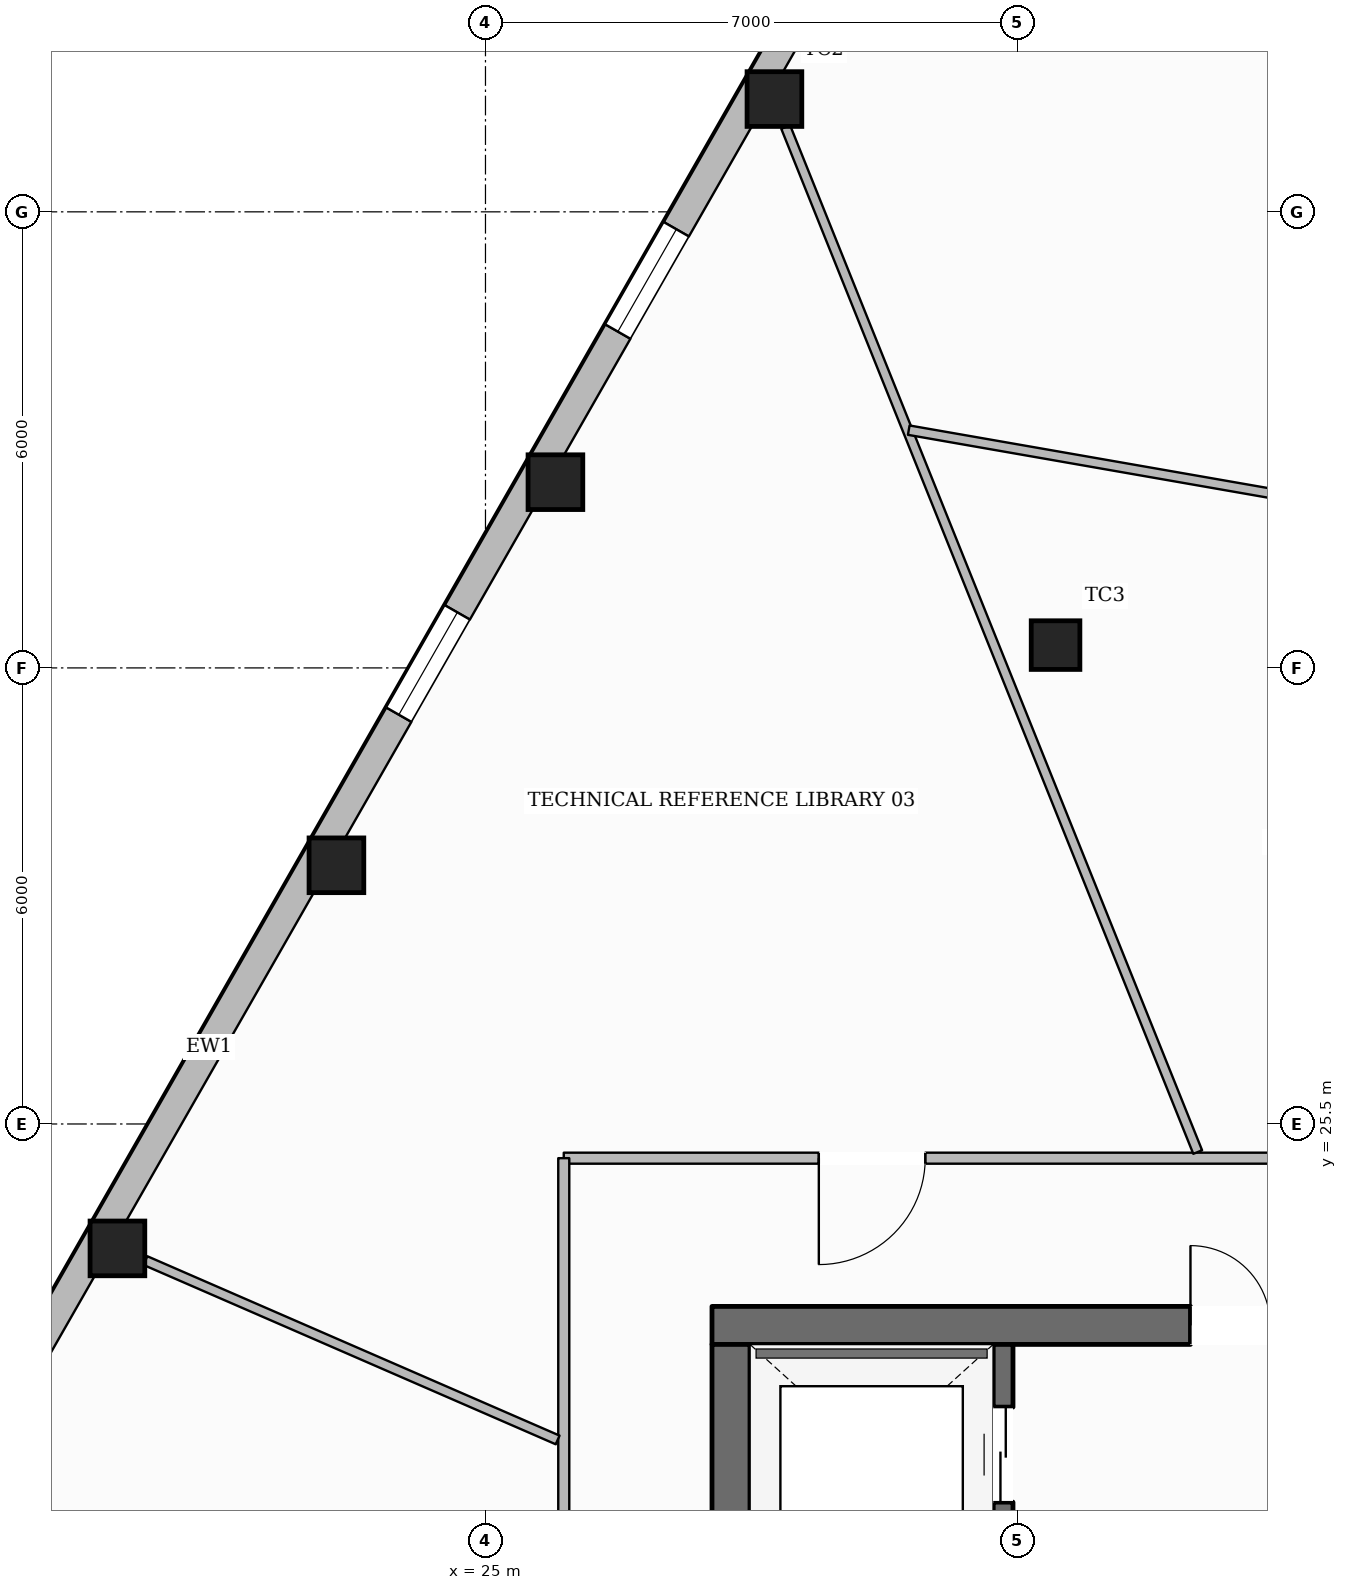
"""IFC4 building model, lengths in metres.
Left out: names, types, materials, properties, quantities, classifications, styles, units other than length and angle.
Written with IfcOpenShell. Run it as: python <this file> out.ifc"""

import sys

from ifc_helpers import new_model, si_unit, direction, frame, frame_2d, origin, origin_2d, place, context, subcontext, project, spatial, rectangle, hollow_rectangle, extrude, element, fill, save


model = new_model("IFC4")
c1 = context("Model", 3, precision=1e-05, world=origin(), true_north=direction((0.0, 1.0)))
c2 = subcontext(c1, "Body", "Model", "MODEL_VIEW")
j1 = project(units=[si_unit("LENGTHUNIT", "METRE"), si_unit("PLANEANGLEUNIT", "RADIAN")], contexts=[c1])
p1 = place(None, origin())
s1 = spatial("IfcSite", under=j1, at=p1, CompositionType="ELEMENT")
p2 = place(p1, origin())
s2 = spatial("IfcBuilding", under=s1, at=p2, CompositionType="ELEMENT")
p3 = place(p2, frame((0.0, 0.0, 89.35)))
s3 = spatial("IfcBuildingStorey", under=s2, at=p3, CompositionType="ELEMENT", Elevation=89.35)
p4 = place(p3, frame((27.98, 22.85, 0.0), z_axis=(0.0, 0.0, 1.0), x_axis=(1.0, 0.0, 0.0)))
e1 = element("IfcWall", 1, at=p4, inside=s3, PredefinedType="SOLIDWALL", context=c2, shape_type="SweptSolid", body=[
    extrude(rectangle(XDim=20.04, YDim=0.5, at=frame_2d((10.02, 0.0))), origin(), (0.0, 0.0, 1.0), 3.6),
])
p5 = place(p4, frame((6.295, 0.0, 0.0)))
e2 = element("IfcOpeningElement", 2, at=p5, cuts=e1, PredefinedType="OPENING", context=c2, shape_type="SweptSolid", body=[
    extrude(rectangle(XDim=1.05, YDim=2.15, at=frame_2d((0.525, 1.075))), frame((0.0, 0.26, 0.0), z_axis=(0.0, -1.0, 0.0), x_axis=(1.0, 0.0, 0.0)), (0.0, 0.0, 1.0), 0.52),
])
p6 = place(p4, frame((12.695, 0.0, 0.0)))
e3 = element("IfcOpeningElement", 3, at=p6, cuts=e1, PredefinedType="OPENING", context=c2, shape_type="SweptSolid", body=[
    extrude(rectangle(XDim=1.05, YDim=2.15, at=frame_2d((0.525, 1.075))), frame((0.0, 0.26, 0.0), z_axis=(0.0, -1.0, 0.0), x_axis=(1.0, 0.0, 0.0)), (0.0, 0.0, 1.0), 0.52),
])
p7 = place(p3, frame((28.23, 9.6, 0.0), z_axis=(0.0, 0.0, 1.0), x_axis=(0.0, 1.0, 0.0)))
e4 = element("IfcWall", 4, at=p7, inside=s3, PredefinedType="SOLIDWALL", context=c2, shape_type="SweptSolid", body=[
    extrude(rectangle(XDim=13.0, YDim=0.5, at=frame_2d((6.5, 0.0))), origin(), (0.0, 0.0, 1.0), 3.6),
])
p8 = place(p7, frame((0.2, 0.0, 0.0)))
e5 = element("IfcOpeningElement", 5, at=p8, cuts=e4, PredefinedType="OPENING", context=c2, shape_type="SweptSolid", body=[
    extrude(rectangle(XDim=1.1, YDim=2.15, at=frame_2d((0.55, 1.075))), frame((0.0, 0.26, 0.0), z_axis=(0.0, -1.0, 0.0), x_axis=(1.0, 0.0, 0.0)), (0.0, 0.0, 1.0), 0.52),
])
p9 = place(p7, frame((8.4, 0.0, 0.0)))
e6 = element("IfcOpeningElement", 6, at=p9, cuts=e4, PredefinedType="OPENING", context=c2, shape_type="SweptSolid", body=[
    extrude(rectangle(XDim=0.9, YDim=2.1, at=frame_2d((0.45, 1.05))), frame((0.0, 0.26, 0.0), z_axis=(0.0, -1.0, 0.0), x_axis=(1.0, 0.0, 0.0)), (0.0, 0.0, 1.0), 0.52),
])
p10 = place(p3, frame((31.81, 9.6, 0.0), z_axis=(0.0, 0.0, 1.0), x_axis=(0.0, 1.0, 0.0)))
e7 = element("IfcWall", 7, at=p10, inside=s3, PredefinedType="SHEAR", context=c2, shape_type="SweptSolid", body=[
    extrude(rectangle(XDim=13.0, YDim=0.26, at=frame_2d((6.5, 0.0))), origin(), (0.0, 0.0, 1.0), 3.6),
])
p11 = place(p10, frame((10.925, 0.0, 0.0)))
e8 = element("IfcOpeningElement", 8, at=p11, cuts=e7, PredefinedType="OPENING", context=c2, shape_type="SweptSolid", body=[
    extrude(rectangle(XDim=1.25, YDim=2.25, at=frame_2d((0.625, 1.125))), frame((0.0, 0.14, 0.0), z_axis=(0.0, -1.0, 0.0), x_axis=(1.0, 0.0, 0.0)), (0.0, 0.0, 1.0), 0.28),
])
for number, where, z_axis, x_axis in (
    (9, (28.802, 38.984, 0.0), (0.0, 0.0, 1.0), (1.0, 0.0, 0.0)),
    (10, (25.92, 33.944, 0.0), (0.0, 0.0, 1.0), (1.0, 0.0, 0.0)),
    (11, (23.039, 28.903, 0.0), (0.0, 0.0, 1.0), (1.0, 0.0, 0.0)),
    (12, (20.158, 23.863, 0.0), (0.0, 0.0, 1.0), (1.0, 0.0, 0.0)),
):
    element("IfcColumn", number, at=place(p3, frame(where, z_axis=z_axis, x_axis=x_axis)), inside=s3, PredefinedType="COLUMN", context=c2, shape_type="SweptSolid", body=[
        extrude(hollow_rectangle(XDim=0.72, YDim=0.72, WallThickness=0.032, at=origin_2d()), origin(), (0.0, 0.0, 1.0), 3.6),
    ])
p12 = place(p3, frame((32.5, 31.8, 0.0), z_axis=(0.0, 0.0, 1.0), x_axis=(1.0, 0.0, 0.0)))
e13 = element("IfcColumn", 13, at=p12, inside=s3, PredefinedType="COLUMN", context=c2, shape_type="SweptSolid", body=[
    extrude(hollow_rectangle(XDim=0.64, YDim=0.64, WallThickness=0.028, at=origin_2d()), origin(), (0.0, 0.0, 1.0), 3.6),
])
p13 = place(p3, frame((13.926, 13.506, 0.0), z_axis=(0.0, 0.0, 1.0), x_axis=(0.496286611319, 0.868158740914, 0.0)))
e14 = element("IfcWall", 14, at=p13, inside=s3, PredefinedType="STANDARD", context=c2, shape_type="SweptSolid", body=[
    extrude(rectangle(XDim=35.785, YDim=0.38, at=frame_2d((17.893, 0.0))), origin(), (0.0, 0.0, 1.0), 3.059),
])
p14 = place(p13, frame((31.63, 0.0, 0.65)))
e15 = element("IfcOpeningElement", 15, at=p14, cuts=e14, PredefinedType="OPENING", context=c2, shape_type="SweptSolid", body=[
    extrude(rectangle(XDim=1.55, YDim=1.75, at=frame_2d((0.775, 0.875))), frame((0.0, 0.2, 0.0), z_axis=(0.0, -1.0, 0.0), x_axis=(1.0, 0.0, 0.0)), (0.0, 0.0, 1.0), 0.4),
])
p15 = place(p13, frame((25.824, 0.0, 0.65)))
e16 = element("IfcOpeningElement", 16, at=p15, cuts=e14, PredefinedType="OPENING", context=c2, shape_type="SweptSolid", body=[
    extrude(rectangle(XDim=1.55, YDim=1.75, at=frame_2d((0.775, 0.875))), frame((0.0, 0.2, 0.0), z_axis=(0.0, -1.0, 0.0), x_axis=(1.0, 0.0, 0.0)), (0.0, 0.0, 1.0), 0.4),
])
p16 = place(p13, frame((20.018, 0.0, 0.65)))
e17 = element("IfcOpeningElement", 17, at=p16, cuts=e14, PredefinedType="OPENING", context=c2, shape_type="SweptSolid", body=[
    extrude(rectangle(XDim=1.55, YDim=1.75, at=frame_2d((0.775, 0.875))), frame((0.0, 0.2, 0.0), z_axis=(0.0, -1.0, 0.0), x_axis=(1.0, 0.0, 0.0)), (0.0, 0.0, 1.0), 0.4),
])
p17 = place(p13, frame((8.407, 0.0, 0.65)))
e18 = element("IfcOpeningElement", 18, at=p17, cuts=e14, PredefinedType="OPENING", context=c2, shape_type="SweptSolid", body=[
    extrude(rectangle(XDim=1.55, YDim=1.75, at=frame_2d((0.775, 0.875))), frame((0.0, 0.2, 0.0), z_axis=(0.0, -1.0, 0.0), x_axis=(1.0, 0.0, 0.0)), (0.0, 0.0, 1.0), 0.4),
])
p18 = place(p13, frame((2.601, 0.0, 0.65)))
e19 = element("IfcOpeningElement", 19, at=p18, cuts=e14, PredefinedType="OPENING", context=c2, shape_type="SweptSolid", body=[
    extrude(rectangle(XDim=1.55, YDim=1.75, at=frame_2d((0.775, 0.875))), frame((0.0, 0.2, 0.0), z_axis=(0.0, -1.0, 0.0), x_axis=(1.0, 0.0, 0.0)), (0.0, 0.0, 1.0), 0.4),
])
p19 = place(p3, frame((49.97, 25.05, 0.0), z_axis=(0.0, 0.0, 1.0), x_axis=(-1.0, 0.0, 0.0)))
e20 = element("IfcWall", 20, at=p19, inside=s3, PredefinedType="PARTITIONING", context=c2, shape_type="SweptSolid", body=[
    extrude(rectangle(XDim=23.94, YDim=0.145, at=frame_2d((11.97, 0.0))), origin(), (0.0, 0.0, 1.0), 3.6),
])
p20 = place(p19, frame((6.743, 0.0, 0.0)))
e21 = element("IfcOpeningElement", 21, at=p20, cuts=e20, PredefinedType="OPENING", context=c2, shape_type="SweptSolid", body=[
    extrude(rectangle(XDim=1.4, YDim=2.2, at=frame_2d((0.7, 1.1))), frame((0.0, 0.083, 0.0), z_axis=(0.0, -1.0, 0.0), x_axis=(1.0, 0.0, 0.0)), (0.0, 0.0, 1.0), 0.165),
])
p21 = place(p19, frame((19.184, 0.0, 0.0)))
e22 = element("IfcOpeningElement", 22, at=p21, cuts=e20, PredefinedType="OPENING", context=c2, shape_type="SweptSolid", body=[
    extrude(rectangle(XDim=1.4, YDim=2.2, at=frame_2d((0.7, 1.1))), frame((0.0, 0.083, 0.0), z_axis=(0.0, -1.0, 0.0), x_axis=(1.0, 0.0, 0.0)), (0.0, 0.0, 1.0), 0.165),
])
p22 = place(p3, frame((26.03, 25.05, 0.0), z_axis=(0.0, 0.0, 1.0), x_axis=(0.0, -1.0, 0.0)))
e23 = element("IfcWall", 23, at=p22, inside=s3, PredefinedType="PARTITIONING", context=c2, shape_type="SweptSolid", body=[
    extrude(rectangle(XDim=17.9, YDim=0.145, at=frame_2d((8.95, 0.0))), origin(), (0.0, 0.0, 1.0), 3.288),
])
p23 = place(p22, frame((8.311, 0.0, 0.0)))
e24 = element("IfcOpeningElement", 24, at=p23, cuts=e23, PredefinedType="OPENING", context=c2, shape_type="SweptSolid", body=[
    extrude(rectangle(XDim=1.4, YDim=2.2, at=frame_2d((0.7, 1.1))), frame((0.0, 0.083, 0.0), z_axis=(0.0, -1.0, 0.0), x_axis=(1.0, 0.0, 0.0)), (0.0, 0.0, 1.0), 0.165),
])
p24 = place(p3, frame((34.37, 25.131, 0.0), z_axis=(0.0, 0.0, 1.0), x_axis=(-0.372968583389, 0.927843971692, 0.0)))
e25 = element("IfcWall", 25, at=p24, inside=s3, PredefinedType="PARTITIONING", context=c2, shape_type="SweptSolid", body=[
    extrude(rectangle(XDim=14.534, YDim=0.125, at=frame_2d((7.267, 0.0))), origin(), (0.0, 0.0, 1.0), 3.141),
])
p25 = place(p3, frame((25.949, 21.343, 0.0), z_axis=(0.0, 0.0, 1.0), x_axis=(-0.916959775259, 0.398979661834, 0.0)))
e26 = element("IfcWall", 26, at=p25, inside=s3, PredefinedType="PARTITIONING", context=c2, shape_type="SweptSolid", body=[
    extrude(rectangle(XDim=5.915, YDim=0.125, at=frame_2d((2.958, 0.0))), origin(), (0.0, 0.0, 1.0), 3.141),
])
p26 = place(p3, frame((51.862, 30.91, 0.0), z_axis=(0.0, 0.0, 1.0), x_axis=(-0.98509938317, 0.17198606129, 0.0)))
e27 = element("IfcWall", 27, at=p26, inside=s3, PredefinedType="PARTITIONING", context=c2, shape_type="SweptSolid", body=[
    extrude(rectangle(XDim=21.615, YDim=0.125, at=frame_2d((10.808, 0.0))), origin(), (0.0, 0.0, 1.0), 3.288),
])
p27 = place(p26, frame((10.176, 0.0, 0.0)))
e28 = element("IfcOpeningElement", 28, at=p27, cuts=e27, PredefinedType="OPENING", context=c2, shape_type="SweptSolid", body=[
    extrude(rectangle(XDim=1.02, YDim=2.15, at=frame_2d((0.51, 1.075))), frame((0.0, 0.073, 0.0), z_axis=(0.0, -1.0, 0.0), x_axis=(1.0, 0.0, 0.0)), (0.0, 0.0, 1.0), 0.145),
])
p28 = place(p15, origin())
e29 = element("IfcWindow", 29, at=p28, inside=s3, PartitioningType="SINGLE_PANEL", PredefinedType="WINDOW", context=c2, shape_type="SweptSolid", body=[
    extrude(rectangle(XDim=1.55, YDim=1.75, at=frame_2d((0.775, 0.875))), frame((0.0, 0.03, 0.0), z_axis=(0.0, -1.0, 0.0), x_axis=(1.0, 0.0, 0.0)), (0.0, 0.0, 1.0), 0.06),
])
fill(e16, e29)
p29 = place(p16, origin())
e30 = element("IfcWindow", 30, at=p29, inside=s3, PartitioningType="SINGLE_PANEL", PredefinedType="WINDOW", context=c2, shape_type="SweptSolid", body=[
    extrude(rectangle(XDim=1.55, YDim=1.75, at=frame_2d((0.775, 0.875))), frame((0.0, 0.03, 0.0), z_axis=(0.0, -1.0, 0.0), x_axis=(1.0, 0.0, 0.0)), (0.0, 0.0, 1.0), 0.06),
])
fill(e17, e30)
p30 = place(p5, origin())
e31 = element("IfcDoor", 31, at=p30, inside=s3, OperationType="SINGLE_SWING_LEFT", PredefinedType="DOOR", context=c2, shape_type="SweptSolid", body=[
    extrude(rectangle(XDim=1.05, YDim=2.15, at=frame_2d((0.525, 1.075))), frame((0.0, 0.025, 0.0), z_axis=(0.0, -1.0, 0.0), x_axis=(1.0, 0.0, 0.0)), (0.0, 0.0, 1.0), 0.05),
])
fill(e2, e31)
p31 = place(p11, origin())
e32 = element("IfcDoor", 32, at=p31, inside=s3, OperationType="DOUBLE_DOOR_SLIDING", PredefinedType="DOOR", context=c2, shape_type="SweptSolid", body=[
    extrude(rectangle(XDim=1.25, YDim=2.25, at=frame_2d((0.625, 1.125))), frame((0.0, 0.025, 0.0), z_axis=(0.0, -1.0, 0.0), x_axis=(1.0, 0.0, 0.0)), (0.0, 0.0, 1.0), 0.05),
])
fill(e8, e32)
p32 = place(p21, origin())
e33 = element("IfcDoor", 33, at=p32, inside=s3, OperationType="SINGLE_SWING_RIGHT", PredefinedType="DOOR", context=c2, shape_type="SweptSolid", body=[
    extrude(rectangle(XDim=1.4, YDim=2.2, at=frame_2d((0.7, 1.1))), frame((0.0, 0.025, 0.0), z_axis=(0.0, -1.0, 0.0), x_axis=(1.0, 0.0, 0.0)), (0.0, 0.0, 1.0), 0.05),
])
fill(e22, e33)
save(model, sys.argv[1])
